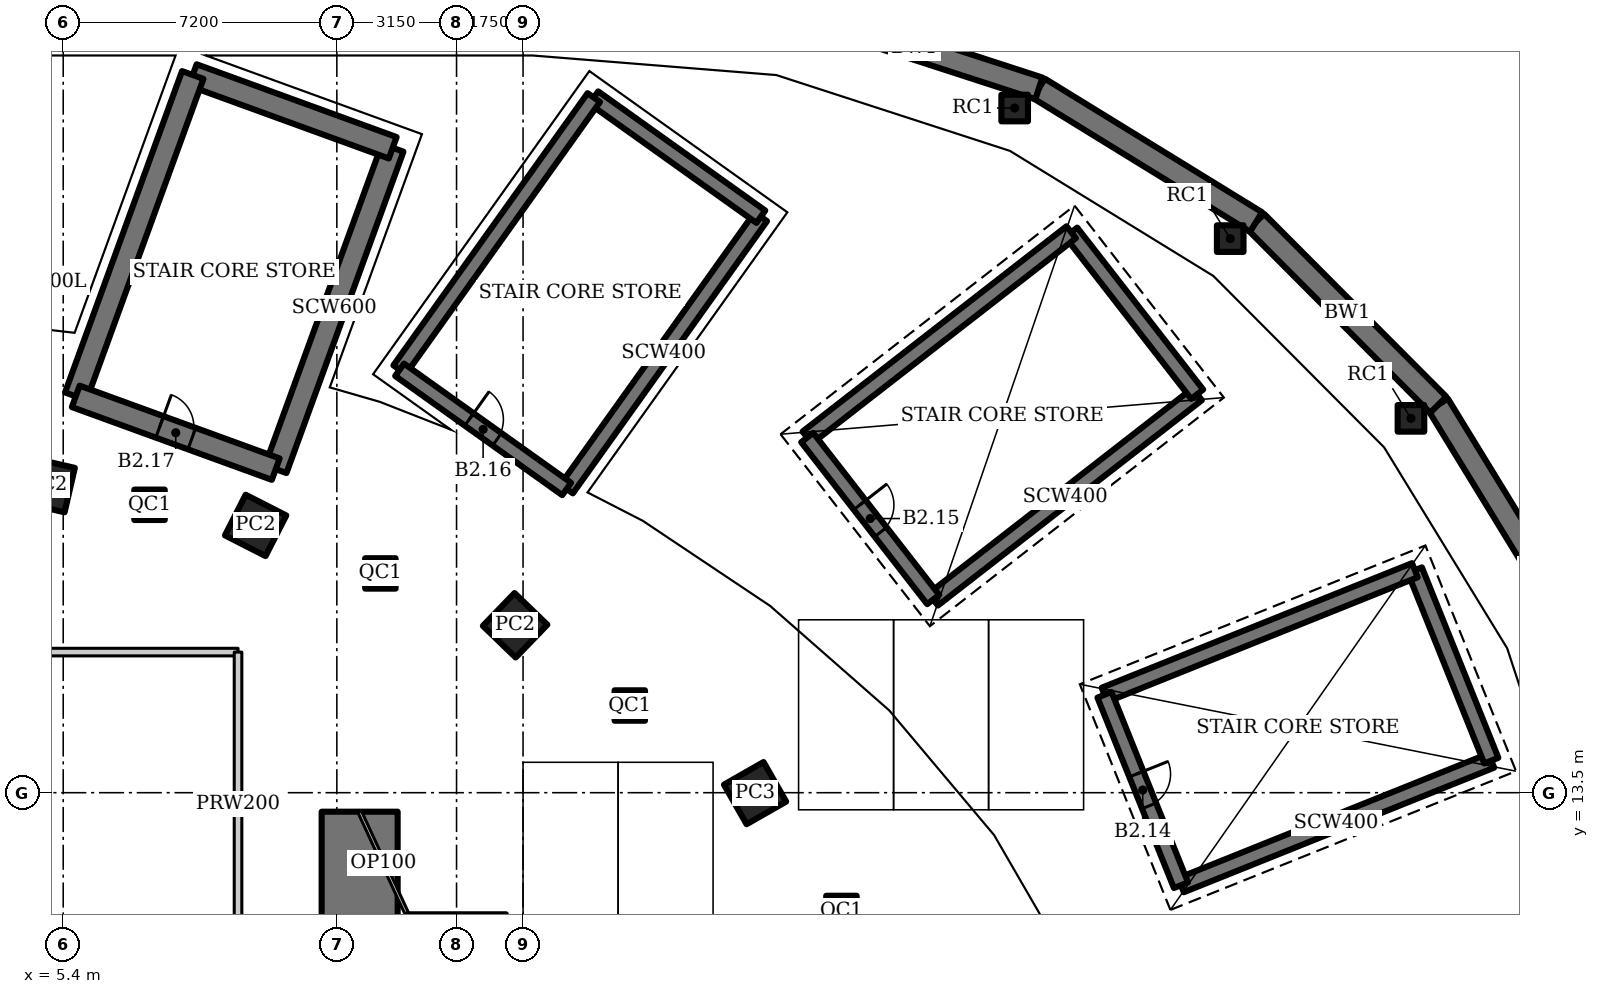
"""IFC4 building model, lengths in metres.
Left out: names, types, materials, properties, quantities, classifications, styles, units other than length and angle.
Written with IfcOpenShell. Run it as: python <this file> out.ifc"""

import sys

from ifc_helpers import new_model, si_unit, direction, frame, frame_2d, origin, origin_2d, place, context, subcontext, project, spatial, rectangle, hollow_rectangle, extrude, element, fill, save


model = new_model("IFC4")
c1 = context("Model", 3, precision=1e-05, world=origin(), true_north=direction((0.0, 1.0)))
c2 = subcontext(c1, "Body", "Model", "MODEL_VIEW")
j1 = project(units=[si_unit("LENGTHUNIT", "METRE"), si_unit("PLANEANGLEUNIT", "RADIAN")], contexts=[c1])
p1 = place(None, origin())
s1 = spatial("IfcSite", under=j1, at=p1, CompositionType="ELEMENT")
p2 = place(p1, origin())
s2 = spatial("IfcBuilding", under=s1, at=p2, CompositionType="ELEMENT")
p3 = place(p2, frame((0.0, 0.0, -10.0)))
s3 = spatial("IfcBuildingStorey", under=s2, at=p3, CompositionType="ELEMENT", Elevation=-10.0)
p4 = place(p3, frame((23.605, 13.489, 0.0), z_axis=(0.0, 0.0, 1.0), x_axis=(0.86824298017, 0.496139221777, 0.0)))
e1 = element("IfcColumn", 1, at=p4, inside=s3, PredefinedType="COLUMN", context=c2, shape_type="SweptSolid", body=[
    extrude(hollow_rectangle(XDim=1.2, YDim=1.2, WallThickness=0.12, at=origin_2d()), origin(), (0.0, 0.0, 1.0), 4.5),
])
for number, where, z_axis, x_axis in (
    (2, (17.291, 17.905, 0.0), (0.0, 0.0, 1.0), (0.695, 0.719, 0.0)),
    (3, (10.463, 20.534, 0.0), (0.0, 0.0, 1.0), (0.454, 0.891, 0.0)),
    (4, (4.986, 21.598, 0.0), (0.0, 0.0, 1.0), (0.225, 0.974, 0.0)),
):
    element("IfcColumn", number, at=place(p3, frame(where, z_axis=z_axis, x_axis=x_axis)), inside=s3, PredefinedType="COLUMN", context=c2, shape_type="SweptSolid", body=[
        extrude(hollow_rectangle(XDim=1.2, YDim=1.2, WallThickness=0.1, at=origin_2d()), origin(), (0.0, 0.0, 1.0), 4.5),
    ])
for number, where, z_axis, x_axis in (
    (5, (25.878, 10.388, 0.0), (0.0, 0.0, 1.0), (1.0, 0.0, 0.0)),
    (6, (20.309, 15.794, 0.0), (0.0, 0.0, 1.0), (1.0, 0.0, 0.0)),
    (7, (13.745, 19.27, 0.0), (0.0, 0.0, 1.0), (1.0, 0.0, 0.0)),
    (8, (7.671, 21.076, 0.0), (0.0, 0.0, 1.0), (1.0, 0.0, 0.0)),
):
    element("IfcColumn", number, at=place(p3, frame(where, z_axis=z_axis, x_axis=x_axis)), inside=s3, PredefinedType="COLUMN", context=c2, shape_type="SweptSolid", body=[
        extrude(hollow_rectangle(XDim=0.8, YDim=0.8, WallThickness=0.05, at=origin_2d()), origin(), (0.0, 0.0, 1.0), 4.5),
    ])
for number, where, z_axis, x_axis in (
    (9, (36.108, 28.081, 0.0), (0.0, 0.0, 1.0), (1.0, 0.0, 0.0)),
    (10, (40.864, 23.351, 0.0), (0.0, 0.0, 1.0), (1.0, 0.0, 0.0)),
    (11, (30.436, 31.518, 0.0), (0.0, 0.0, 1.0), (1.0, 0.0, 0.0)),
):
    element("IfcColumn", number, at=place(p3, frame(where, z_axis=z_axis, x_axis=x_axis)), inside=s3, PredefinedType="COLUMN", context=c2, shape_type="SweptSolid", body=[
        extrude(hollow_rectangle(XDim=0.7, YDim=0.7, WallThickness=0.04, at=origin_2d()), origin(), (0.0, 0.0, 1.0), 4.5),
    ])
p5 = place(p3, frame((13.2, -13.0, 0.0), z_axis=(0.0, 0.0, 1.0), x_axis=(0.0, 1.0, 0.0)))
e12 = element("IfcWall", 12, at=p5, inside=s3, PredefinedType="SHEAR", context=c2, shape_type="SweptSolid", body=[
    extrude(rectangle(XDim=26.0, YDim=2.0, at=frame_2d((13.0, 0.0))), origin(), (0.0, 0.0, 1.0), 4.5),
])
p6 = place(p5, frame((12.1, 0.0, 0.0)))
e13 = element("IfcOpeningElement", 13, at=p6, cuts=e12, PredefinedType="OPENING", context=c2, shape_type="SweptSolid", body=[
    extrude(rectangle(XDim=1.8, YDim=2.1, at=frame_2d((0.9, 1.05))), frame((0.0, 1.01, 0.0), z_axis=(0.0, -1.0, 0.0), x_axis=(1.0, 0.0, 0.0)), (0.0, 0.0, 1.0), 2.02),
])
p7 = place(p3, frame((45.039, 18.064, 0.0), z_axis=(0.0, 0.0, 1.0), x_axis=(-0.522223921517, 0.852808405092, 0.0)))
e14 = element("IfcWall", 14, at=p7, inside=s3, PredefinedType="SOLIDWALL", context=c2, shape_type="SweptSolid", body=[
    extrude(rectangle(XDim=6.621, YDim=0.6, at=frame_2d((3.311, 0.0))), origin(), (0.0, 0.0, 1.0), 4.5),
])
p8 = place(p3, frame((41.582, 23.71, 0.0), z_axis=(0.0, 0.0, 1.0), x_axis=(-0.705901268363, 0.708310242283, 0.0)))
e15 = element("IfcWall", 15, at=p8, inside=s3, PredefinedType="SOLIDWALL", context=c2, shape_type="SweptSolid", body=[
    extrude(rectangle(XDim=6.79, YDim=0.6, at=frame_2d((3.395, 0.0))), origin(), (0.0, 0.0, 1.0), 4.5),
])
p9 = place(p3, frame((36.789, 28.52, 0.0), z_axis=(0.0, 0.0, 1.0), x_axis=(-0.851796965753, 0.523872054165, 0.0)))
e16 = element("IfcWall", 16, at=p9, inside=s3, PredefinedType="SOLIDWALL", context=c2, shape_type="SweptSolid", body=[
    extrude(rectangle(XDim=6.709, YDim=0.6, at=frame_2d((3.355, 0.0))), origin(), (0.0, 0.0, 1.0), 4.5),
])
p10 = place(p3, frame((31.073, 32.034, 0.0), z_axis=(0.0, 0.0, 1.0), x_axis=(-0.951130883604, 0.308788021554, 0.0)))
e17 = element("IfcWall", 17, at=p10, inside=s3, PredefinedType="SOLIDWALL", context=c2, shape_type="SweptSolid", body=[
    extrude(rectangle(XDim=6.89, YDim=0.6, at=frame_2d((3.445, 0.0))), origin(), (0.0, 0.0, 1.0), 4.5),
])
p11 = place(p3, frame((-10.0, 17.2, 0.0), z_axis=(0.0, 0.0, 1.0), x_axis=(1.0, 0.0, 0.0)))
e18 = element("IfcWall", 18, at=p11, inside=s3, PredefinedType="SOLIDWALL", context=c2, shape_type="SweptSolid", body=[
    extrude(rectangle(XDim=20.0, YDim=0.2, at=frame_2d((10.0, 0.0))), origin(), (0.0, 0.0, 1.0), 4.2),
])
p12 = place(p11, frame((9.1, 0.0, 0.0)))
e19 = element("IfcOpeningElement", 19, at=p12, cuts=e18, PredefinedType="OPENING", context=c2, shape_type="SweptSolid", body=[
    extrude(rectangle(XDim=1.8, YDim=2.1, at=frame_2d((0.9, 1.05))), frame((0.0, 0.11, 0.0), z_axis=(0.0, -1.0, 0.0), x_axis=(1.0, 0.0, 0.0)), (0.0, 0.0, 1.0), 0.22),
])
p13 = place(p3, frame((10.0, 9.2, 0.0), z_axis=(0.0, 0.0, 1.0), x_axis=(0.0, 1.0, 0.0)))
e20 = element("IfcWall", 20, at=p13, inside=s3, PredefinedType="SOLIDWALL", context=c2, shape_type="SweptSolid", body=[
    extrude(rectangle(XDim=8.0, YDim=0.2, at=frame_2d((4.0, 0.0))), origin(), (0.0, 0.0, 1.0), 4.2),
])
p14 = place(p3, frame((34.812, 11.065, 0.0), z_axis=(0.0, 0.0, 1.0), x_axis=(0.92801678004, 0.372538395288, 0.0)))
e21 = element("IfcWall", 21, at=p14, inside=s3, PredefinedType="SHEAR", context=c2, shape_type="SweptSolid", body=[
    extrude(rectangle(XDim=8.8, YDim=0.4, at=frame_2d((4.4, 0.0))), origin(), (0.0, 0.0, 1.0), 4.5),
])
p15 = place(p3, frame((42.978, 14.344, 0.0), z_axis=(0.0, 0.0, 1.0), x_axis=(-0.372544066459, 0.928014503414, 0.0)))
e22 = element("IfcWall", 22, at=p15, inside=s3, PredefinedType="SHEAR", context=c2, shape_type="SweptSolid", body=[
    extrude(rectangle(XDim=5.4, YDim=0.4, at=frame_2d((2.7, 0.0))), origin(), (0.0, 0.0, 1.0), 4.5),
])
p16 = place(p3, frame((40.967, 19.355, 0.0), z_axis=(0.0, 0.0, 1.0), x_axis=(-0.92801678004, -0.372538395288, 0.0)))
e23 = element("IfcWall", 23, at=p16, inside=s3, PredefinedType="SHEAR", context=c2, shape_type="SweptSolid", body=[
    extrude(rectangle(XDim=8.8, YDim=0.4, at=frame_2d((4.4, 0.0))), origin(), (0.0, 0.0, 1.0), 4.5),
])
p17 = place(p3, frame((32.8, 16.077, 0.0), z_axis=(0.0, 0.0, 1.0), x_axis=(0.372544066459, -0.928014503414, 0.0)))
e24 = element("IfcWall", 24, at=p17, inside=s3, PredefinedType="SHEAR", context=c2, shape_type="SweptSolid", body=[
    extrude(rectangle(XDim=5.4, YDim=0.4, at=frame_2d((2.7, 0.0))), origin(), (0.0, 0.0, 1.0), 4.5),
])
p18 = place(p17, frame((2.25, 0.0, 0.0)))
e25 = element("IfcOpeningElement", 25, at=p18, cuts=e24, PredefinedType="OPENING", context=c2, shape_type="SweptSolid", body=[
    extrude(rectangle(XDim=0.9, YDim=2.1, at=frame_2d((0.45, 1.05))), frame((0.0, 0.21, 0.0), z_axis=(0.0, -1.0, 0.0), x_axis=(1.0, 0.0, 0.0)), (0.0, 0.0, 1.0), 0.42),
])
p19 = place(p3, frame((28.293, 18.583, 0.0), z_axis=(0.0, 0.0, 1.0), x_axis=(0.78938060008, 0.613904119726, 0.0)))
e26 = element("IfcWall", 26, at=p19, inside=s3, PredefinedType="SHEAR", context=c2, shape_type="SweptSolid", body=[
    extrude(rectangle(XDim=8.8, YDim=0.4, at=frame_2d((4.4, 0.0))), origin(), (0.0, 0.0, 1.0), 4.5),
])
p20 = place(p3, frame((35.239, 23.985, 0.0), z_axis=(0.0, 0.0, 1.0), x_axis=(-0.613912443548, 0.789374126544, 0.0)))
e27 = element("IfcWall", 27, at=p20, inside=s3, PredefinedType="SHEAR", context=c2, shape_type="SweptSolid", body=[
    extrude(rectangle(XDim=5.4, YDim=0.4, at=frame_2d((2.7, 0.0))), origin(), (0.0, 0.0, 1.0), 4.5),
])
p21 = place(p3, frame((31.924, 28.248, 0.0), z_axis=(0.0, 0.0, 1.0), x_axis=(-0.78938060008, -0.613904119726, 0.0)))
e28 = element("IfcWall", 28, at=p21, inside=s3, PredefinedType="SHEAR", context=c2, shape_type="SweptSolid", body=[
    extrude(rectangle(XDim=8.8, YDim=0.4, at=frame_2d((4.4, 0.0))), origin(), (0.0, 0.0, 1.0), 4.5),
])
p22 = place(p3, frame((24.978, 22.846, 0.0), z_axis=(0.0, 0.0, 1.0), x_axis=(0.613912443548, -0.789374126544, 0.0)))
e29 = element("IfcWall", 29, at=p22, inside=s3, PredefinedType="SHEAR", context=c2, shape_type="SweptSolid", body=[
    extrude(rectangle(XDim=5.4, YDim=0.4, at=frame_2d((2.7, 0.0))), origin(), (0.0, 0.0, 1.0), 4.5),
])
p23 = place(p22, frame((2.25, 0.0, 0.0)))
e30 = element("IfcOpeningElement", 30, at=p23, cuts=e29, PredefinedType="OPENING", context=c2, shape_type="SweptSolid", body=[
    extrude(rectangle(XDim=0.9, YDim=2.1, at=frame_2d((0.45, 1.05))), frame((0.0, 0.21, 0.0), z_axis=(0.0, -1.0, 0.0), x_axis=(1.0, 0.0, 0.0)), (0.0, 0.0, 1.0), 0.42),
])
p24 = place(p3, frame((18.647, 21.493, 0.0), z_axis=(0.0, 0.0, 1.0), x_axis=(0.580705313356, 0.814113836659, 0.0)))
e31 = element("IfcWall", 31, at=p24, inside=s3, PredefinedType="SHEAR", context=c2, shape_type="SweptSolid", body=[
    extrude(rectangle(XDim=8.8, YDim=0.4, at=frame_2d((4.4, 0.0))), origin(), (0.0, 0.0, 1.0), 4.5),
])
p25 = place(p3, frame((23.757, 28.657, 0.0), z_axis=(0.0, 0.0, 1.0), x_axis=(-0.814121252423, 0.580694916762, 0.0)))
e32 = element("IfcWall", 32, at=p25, inside=s3, PredefinedType="SHEAR", context=c2, shape_type="SweptSolid", body=[
    extrude(rectangle(XDim=5.4, YDim=0.4, at=frame_2d((2.7, 0.0))), origin(), (0.0, 0.0, 1.0), 4.5),
])
p26 = place(p3, frame((19.361, 31.793, 0.0), z_axis=(0.0, 0.0, 1.0), x_axis=(-0.580705313356, -0.814113836659, 0.0)))
e33 = element("IfcWall", 33, at=p26, inside=s3, PredefinedType="SHEAR", context=c2, shape_type="SweptSolid", body=[
    extrude(rectangle(XDim=8.8, YDim=0.4, at=frame_2d((4.4, 0.0))), origin(), (0.0, 0.0, 1.0), 4.5),
])
p27 = place(p3, frame((14.251, 24.629, 0.0), z_axis=(0.0, 0.0, 1.0), x_axis=(0.814121252423, -0.580694916762, 0.0)))
e34 = element("IfcWall", 34, at=p27, inside=s3, PredefinedType="SHEAR", context=c2, shape_type="SweptSolid", body=[
    extrude(rectangle(XDim=5.4, YDim=0.4, at=frame_2d((2.7, 0.0))), origin(), (0.0, 0.0, 1.0), 4.5),
])
p28 = place(p27, frame((2.25, 0.0, 0.0)))
e35 = element("IfcOpeningElement", 35, at=p28, cuts=e34, PredefinedType="OPENING", context=c2, shape_type="SweptSolid", body=[
    extrude(rectangle(XDim=0.9, YDim=2.1, at=frame_2d((0.45, 1.05))), frame((0.0, 0.21, 0.0), z_axis=(0.0, -1.0, 0.0), x_axis=(1.0, 0.0, 0.0)), (0.0, 0.0, 1.0), 0.42),
])
p29 = place(p3, frame((10.992, 22.014, 0.0), z_axis=(0.0, 0.0, 1.0), x_axis=(0.342013127703, 0.939695174234, 0.0)))
e36 = element("IfcWall", 36, at=p29, inside=s3, PredefinedType="SHEAR", context=c2, shape_type="SweptSolid", body=[
    extrude(rectangle(XDim=9.0, YDim=0.6, at=frame_2d((4.5, 0.0))), origin(), (0.0, 0.0, 1.0), 4.5),
])
p30 = place(p3, frame((14.07, 30.471, 0.0), z_axis=(0.0, 0.0, 1.0), x_axis=(-0.939692822968, 0.342019587834, 0.0)))
e37 = element("IfcWall", 37, at=p30, inside=s3, PredefinedType="SHEAR", context=c2, shape_type="SweptSolid", body=[
    extrude(rectangle(XDim=5.6, YDim=0.6, at=frame_2d((2.8, 0.0))), origin(), (0.0, 0.0, 1.0), 4.5),
])
p31 = place(p3, frame((8.808, 32.387, 0.0), z_axis=(0.0, 0.0, 1.0), x_axis=(-0.3420218461, -0.939692001025, 0.0)))
e38 = element("IfcWall", 38, at=p31, inside=s3, PredefinedType="SHEAR", context=c2, shape_type="SweptSolid", body=[
    extrude(rectangle(XDim=9.0, YDim=0.6, at=frame_2d((4.5, 0.0))), origin(), (0.0, 0.0, 1.0), 4.5),
])
p32 = place(p3, frame((5.73, 23.93, 0.0), z_axis=(0.0, 0.0, 1.0), x_axis=(0.939678810556, -0.342058084236, 0.0)))
e39 = element("IfcWall", 39, at=p32, inside=s3, PredefinedType="SHEAR", context=c2, shape_type="SweptSolid", body=[
    extrude(rectangle(XDim=5.6, YDim=0.6, at=frame_2d((2.8, 0.0))), origin(), (0.0, 0.0, 1.0), 4.5),
])
p33 = place(p32, frame((2.35, 0.0, 0.0)))
e40 = element("IfcOpeningElement", 40, at=p33, cuts=e39, PredefinedType="OPENING", context=c2, shape_type="SweptSolid", body=[
    extrude(rectangle(XDim=0.9, YDim=2.1, at=frame_2d((0.45, 1.05))), frame((0.0, 0.31, 0.0), z_axis=(0.0, -1.0, 0.0), x_axis=(1.0, 0.0, 0.0)), (0.0, 0.0, 1.0), 0.62),
])
p34 = place(p3, frame((13.2, 13.0, 0.0), z_axis=(0.0, 0.0, 1.0), x_axis=(0.420129824888, -0.907464010437, 0.0)))
e41 = element("IfcWall", 41, at=p34, inside=s3, PredefinedType="PARTITIONING", context=c2, shape_type="SweptSolid", body=[
    extrude(rectangle(XDim=2.975, YDim=0.1, at=frame_2d((1.488, 0.0))), origin(), (0.0, 0.0, 1.0), 4.2),
])
p35 = place(p18, origin())
e42 = element("IfcDoor", 42, at=p35, inside=s3, OperationType="SINGLE_SWING_LEFT", PredefinedType="DOOR", context=c2, shape_type="SweptSolid", body=[
    extrude(rectangle(XDim=0.9, YDim=2.1, at=frame_2d((0.45, 1.05))), frame((0.0, 0.025, 0.0), z_axis=(0.0, -1.0, 0.0), x_axis=(1.0, 0.0, 0.0)), (0.0, 0.0, 1.0), 0.05),
])
fill(e25, e42)
p36 = place(p23, origin())
e43 = element("IfcDoor", 43, at=p36, inside=s3, OperationType="SINGLE_SWING_LEFT", PredefinedType="DOOR", context=c2, shape_type="SweptSolid", body=[
    extrude(rectangle(XDim=0.9, YDim=2.1, at=frame_2d((0.45, 1.05))), frame((0.0, 0.025, 0.0), z_axis=(0.0, -1.0, 0.0), x_axis=(1.0, 0.0, 0.0)), (0.0, 0.0, 1.0), 0.05),
])
fill(e30, e43)
p37 = place(p28, origin())
e44 = element("IfcDoor", 44, at=p37, inside=s3, OperationType="SINGLE_SWING_LEFT", PredefinedType="DOOR", context=c2, shape_type="SweptSolid", body=[
    extrude(rectangle(XDim=0.9, YDim=2.1, at=frame_2d((0.45, 1.05))), frame((0.0, 0.025, 0.0), z_axis=(0.0, -1.0, 0.0), x_axis=(1.0, 0.0, 0.0)), (0.0, 0.0, 1.0), 0.05),
])
fill(e35, e44)
p38 = place(p33, origin())
e45 = element("IfcDoor", 45, at=p38, inside=s3, OperationType="SINGLE_SWING_LEFT", PredefinedType="DOOR", context=c2, shape_type="SweptSolid", body=[
    extrude(rectangle(XDim=0.9, YDim=2.1, at=frame_2d((0.45, 1.05))), frame((0.0, 0.025, 0.0), z_axis=(0.0, -1.0, 0.0), x_axis=(1.0, 0.0, 0.0)), (0.0, 0.0, 1.0), 0.05),
])
fill(e40, e45)
save(model, sys.argv[1])
